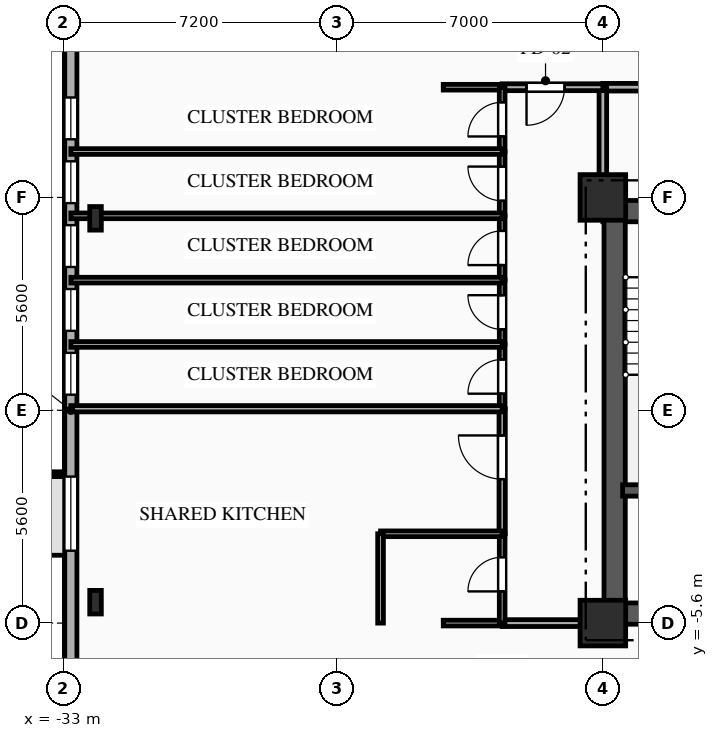
"""IFC4 building model, lengths in metres.
Left out: names, types, materials, properties, quantities, classifications, styles, units other than length and angle.
Written with IfcOpenShell. Run it as: python <this file> out.ifc"""

import sys

from ifc_helpers import new_model, si_unit, direction, frame, frame_2d, origin, origin_2d, place, context, subcontext, project, spatial, rectangle, i_section, extrude, element, fill, save


model = new_model("IFC4")
c1 = context("Model", 3, precision=1e-05, world=origin(), true_north=direction((0.0, 1.0)))
c2 = subcontext(c1, "Body", "Model", "MODEL_VIEW")
j1 = project(units=[si_unit("LENGTHUNIT", "METRE"), si_unit("PLANEANGLEUNIT", "RADIAN")], contexts=[c1])
p1 = place(None, origin())
s1 = spatial("IfcSite", under=j1, at=p1, CompositionType="ELEMENT")
p2 = place(p1, origin())
s2 = spatial("IfcBuilding", under=s1, at=p2, CompositionType="ELEMENT")
p3 = place(p2, frame((0.0, 0.0, 43.75)))
s3 = spatial("IfcBuildingStorey", under=s2, at=p3, CompositionType="ELEMENT", Elevation=43.75)
for number, where, z_axis, x_axis in (
    (1, (-18.8, -5.6, 0.0), (0.0, 0.0, 1.0), (1.0, 0.0, 0.0)),
    (2, (-18.8, 5.6, 0.0), (0.0, 0.0, 1.0), (1.0, 0.0, 0.0)),
):
    element("IfcColumn", number, at=place(p3, frame(where, z_axis=z_axis, x_axis=x_axis)), inside=s3, PredefinedType="COLUMN", context=c2, shape_type="SweptSolid", body=[
        extrude(rectangle(XDim=1.2, YDim=1.2, at=origin_2d()), origin(), (0.0, 0.0, 1.0), 3.35),
    ])
for number, where, z_axis, x_axis in (
    (3, (-32.15, 5.05, 0.0), (0.0, 0.0, 1.0), (1.0, 0.0, 0.0)),
    (4, (-32.15, -5.05, 0.0), (0.0, 0.0, 1.0), (1.0, 0.0, 0.0)),
):
    element("IfcColumn", number, at=place(p3, frame(where, z_axis=z_axis, x_axis=x_axis)), inside=s3, PredefinedType="COLUMN", context=c2, shape_type="SweptSolid", body=[
        extrude(i_section(OverallWidth=0.305, OverallDepth=0.62, WebThickness=0.021, FlangeThickness=0.04, FilletRadius=0.027, at=origin_2d()), origin(), (0.0, 0.0, 1.0), 3.35),
    ])
p4 = place(p3, frame((-32.8, -15.8, 0.0), z_axis=(0.0, 0.0, 1.0), x_axis=(0.0, 1.0, 0.0)))
e5 = element("IfcWall", 5, at=p4, inside=s3, PredefinedType="SOLIDWALL", context=c2, shape_type="SweptSolid", body=[
    extrude(rectangle(XDim=31.6, YDim=0.32, at=frame_2d((15.8, 0.0))), origin(), (0.0, 0.0, 1.0), 3.035),
])
p5 = place(p4, frame((12.105, 0.0, 0.85)))
e6 = element("IfcOpeningElement", 6, at=p5, cuts=e5, PredefinedType="OPENING", context=c2, shape_type="SweptSolid", body=[
    extrude(rectangle(XDim=1.95, YDim=1.85, at=frame_2d((0.975, 0.925))), frame((0.0, 0.17, 0.0), z_axis=(0.0, -1.0, 0.0), x_axis=(1.0, 0.0, 0.0)), (0.0, 0.0, 1.0), 0.34),
])
p6 = place(p4, frame((16.21, 0.0, 0.85)))
e7 = element("IfcOpeningElement", 7, at=p6, cuts=e5, PredefinedType="OPENING", context=c2, shape_type="SweptSolid", body=[
    extrude(rectangle(XDim=1.1, YDim=1.85, at=frame_2d((0.55, 0.925))), frame((0.0, 0.17, 0.0), z_axis=(0.0, -1.0, 0.0), x_axis=(1.0, 0.0, 0.0)), (0.0, 0.0, 1.0), 0.34),
])
p7 = place(p4, frame((17.89, 0.0, 0.85)))
e8 = element("IfcOpeningElement", 8, at=p7, cuts=e5, PredefinedType="OPENING", context=c2, shape_type="SweptSolid", body=[
    extrude(rectangle(XDim=1.1, YDim=1.85, at=frame_2d((0.55, 0.925))), frame((0.0, 0.17, 0.0), z_axis=(0.0, -1.0, 0.0), x_axis=(1.0, 0.0, 0.0)), (0.0, 0.0, 1.0), 0.34),
])
p8 = place(p4, frame((19.57, 0.0, 0.85)))
e9 = element("IfcOpeningElement", 9, at=p8, cuts=e5, PredefinedType="OPENING", context=c2, shape_type="SweptSolid", body=[
    extrude(rectangle(XDim=1.1, YDim=1.85, at=frame_2d((0.55, 0.925))), frame((0.0, 0.17, 0.0), z_axis=(0.0, -1.0, 0.0), x_axis=(1.0, 0.0, 0.0)), (0.0, 0.0, 1.0), 0.34),
])
p9 = place(p4, frame((21.25, 0.0, 0.85)))
e10 = element("IfcOpeningElement", 10, at=p9, cuts=e5, PredefinedType="OPENING", context=c2, shape_type="SweptSolid", body=[
    extrude(rectangle(XDim=1.1, YDim=1.85, at=frame_2d((0.55, 0.925))), frame((0.0, 0.17, 0.0), z_axis=(0.0, -1.0, 0.0), x_axis=(1.0, 0.0, 0.0)), (0.0, 0.0, 1.0), 0.34),
])
p10 = place(p4, frame((22.93, 0.0, 0.85)))
e11 = element("IfcOpeningElement", 11, at=p10, cuts=e5, PredefinedType="OPENING", context=c2, shape_type="SweptSolid", body=[
    extrude(rectangle(XDim=1.1, YDim=1.85, at=frame_2d((0.55, 0.925))), frame((0.0, 0.17, 0.0), z_axis=(0.0, -1.0, 0.0), x_axis=(1.0, 0.0, 0.0)), (0.0, 0.0, 1.0), 0.34),
])
p11 = place(p3, frame((-18.8, 5.24, 0.0), z_axis=(0.0, 0.0, 1.0), x_axis=(1.0, 0.0, 0.0)))
e12 = element("IfcWall", 12, at=p11, inside=s3, PredefinedType="SHEAR", context=c2, shape_type="SweptSolid", body=[
    extrude(rectangle(XDim=9.6, YDim=0.56, at=frame_2d((4.8, 0.0))), origin(), (0.0, 0.0, 1.0), 3.035),
])
p12 = place(p11, frame((1.55, 0.0, 0.0)))
e13 = element("IfcOpeningElement", 13, at=p12, cuts=e12, PredefinedType="OPENING", context=c2, shape_type="SweptSolid", body=[
    extrude(rectangle(XDim=1.1, YDim=2.15, at=frame_2d((0.55, 1.075))), frame((0.0, 0.29, 0.0), z_axis=(0.0, -1.0, 0.0), x_axis=(1.0, 0.0, 0.0)), (0.0, 0.0, 1.0), 0.58),
])
p13 = place(p11, frame((4.775, 0.0, 0.0)))
e14 = element("IfcOpeningElement", 14, at=p13, cuts=e12, PredefinedType="OPENING", context=c2, shape_type="SweptSolid", body=[
    extrude(rectangle(XDim=1.05, YDim=2.1, at=frame_2d((0.525, 1.05))), frame((0.0, 0.29, 0.0), z_axis=(0.0, -1.0, 0.0), x_axis=(1.0, 0.0, 0.0)), (0.0, 0.0, 1.0), 0.58),
])
p14 = place(p3, frame((-18.8, -5.35, 0.0), z_axis=(0.0, 0.0, 1.0), x_axis=(1.0, 0.0, 0.0)))
e15 = element("IfcWall", 15, at=p14, inside=s3, PredefinedType="SHEAR", context=c2, shape_type="SweptSolid", body=[
    extrude(rectangle(XDim=9.6, YDim=0.56, at=frame_2d((4.8, 0.0))), origin(), (0.0, 0.0, 1.0), 3.035),
])
p15 = place(p14, frame((1.05, 0.0, 0.0)))
e16 = element("IfcOpeningElement", 16, at=p15, cuts=e15, PredefinedType="OPENING", context=c2, shape_type="SweptSolid", body=[
    extrude(rectangle(XDim=0.9, YDim=2.1, at=frame_2d((0.45, 1.05))), frame((0.0, 0.29, 0.0), z_axis=(0.0, -1.0, 0.0), x_axis=(1.0, 0.0, 0.0)), (0.0, 0.0, 1.0), 0.58),
])
p16 = place(p3, frame((-18.49, -5.05, 0.0), z_axis=(0.0, 0.0, 1.0), x_axis=(0.0, 1.0, 0.0)))
e17 = element("IfcWall", 17, at=p16, inside=s3, PredefinedType="SHEAR", context=c2, shape_type="SweptSolid", body=[
    extrude(rectangle(XDim=10.1, YDim=0.56, at=frame_2d((5.05, 0.0))), origin(), (0.0, 0.0, 1.0), 3.035),
])
p17 = place(p3, frame((-18.28, -2.11, 0.0), z_axis=(0.0, 0.0, 1.0), x_axis=(1.0, 0.0, 0.0)))
e18 = element("IfcWall", 18, at=p17, inside=s3, PredefinedType="SHEAR", context=c2, shape_type="SweptSolid", body=[
    extrude(rectangle(XDim=3.18, YDim=0.3, at=frame_2d((1.59, 0.0))), origin(), (0.0, 0.0, 1.0), 3.035),
])
p18 = place(p3, frame((-12.0, 8.5, 0.0), z_axis=(0.0, 0.0, 1.0), x_axis=(-1.0, 0.0, 0.0)))
e19 = element("IfcWall", 19, at=p18, inside=s3, PredefinedType="PARTITIONING", context=c2, shape_type="SweptSolid", body=[
    extrude(rectangle(XDim=6.8, YDim=0.2, at=frame_2d((3.4, 0.0))), origin(), (0.0, 0.0, 1.0), 3.035),
])
p19 = place(p18, frame((1.715, 0.0, 0.0)))
e20 = element("IfcOpeningElement", 20, at=p19, cuts=e19, PredefinedType="OPENING", context=c2, shape_type="SweptSolid", body=[
    extrude(rectangle(XDim=1.1, YDim=2.15, at=frame_2d((0.55, 1.075))), frame((0.0, 0.11, 0.0), z_axis=(0.0, -1.0, 0.0), x_axis=(1.0, 0.0, 0.0)), (0.0, 0.0, 1.0), 0.22),
])
p20 = place(p3, frame((-18.8, 8.5, 0.0), z_axis=(0.0, 0.0, 1.0), x_axis=(0.0, -1.0, 0.0)))
e21 = element("IfcWall", 21, at=p20, inside=s3, PredefinedType="PARTITIONING", context=c2, shape_type="SweptSolid", body=[
    extrude(rectangle(XDim=2.9, YDim=0.2, at=frame_2d((1.45, 0.0))), origin(), (0.0, 0.0, 1.0), 2.52),
])
p21 = place(p3, frame((-18.8, 8.5, 0.0), z_axis=(0.0, 0.0, 1.0), x_axis=(-1.0, 0.0, 0.0)))
e22 = element("IfcWall", 22, at=p21, inside=s3, PredefinedType="PARTITIONING", context=c2, shape_type="SweptSolid", body=[
    extrude(rectangle(XDim=2.65, YDim=0.18, at=frame_2d((1.325, 0.0))), origin(), (0.0, 0.0, 1.0), 3.035),
])
p22 = place(p21, frame((1.009, 0.0, 0.0)))
e23 = element("IfcOpeningElement", 23, at=p22, cuts=e22, PredefinedType="OPENING", context=c2, shape_type="SweptSolid", body=[
    extrude(rectangle(XDim=1.0, YDim=2.15, at=frame_2d((0.5, 1.075))), frame((0.0, 0.1, 0.0), z_axis=(0.0, -1.0, 0.0), x_axis=(1.0, 0.0, 0.0)), (0.0, 0.0, 1.0), 0.2),
])
p23 = place(p3, frame((-21.45, 8.5, 0.0), z_axis=(0.0, 0.0, 1.0), x_axis=(-1.0, 0.0, 0.0)))
e24 = element("IfcWall", 24, at=p23, inside=s3, PredefinedType="PARTITIONING", context=c2, shape_type="SweptSolid", body=[
    extrude(rectangle(XDim=1.55, YDim=0.15, at=frame_2d((0.775, 0.0))), origin(), (0.0, 0.0, 1.0), 3.035),
])
p24 = place(p3, frame((-21.45, -5.6, 0.0), z_axis=(0.0, 0.0, 1.0), x_axis=(1.0, 0.0, 0.0)))
e25 = element("IfcWall", 25, at=p24, inside=s3, PredefinedType="PARTITIONING", context=c2, shape_type="SweptSolid", body=[
    extrude(rectangle(XDim=2.65, YDim=0.18, at=frame_2d((1.325, 0.0))), origin(), (0.0, 0.0, 1.0), 3.035),
])
p25 = place(p3, frame((-23.0, -5.6, 0.0), z_axis=(0.0, 0.0, 1.0), x_axis=(1.0, 0.0, 0.0)))
e26 = element("IfcWall", 26, at=p25, inside=s3, PredefinedType="PLUMBINGWALL", context=c2, shape_type="SweptSolid", body=[
    extrude(rectangle(XDim=1.55, YDim=0.15, at=frame_2d((0.775, 0.0))), origin(), (0.0, 0.0, 1.0), 3.035),
])
p26 = place(p3, frame((-21.45, -5.6, 0.0), z_axis=(0.0, 0.0, 1.0), x_axis=(0.0, 1.0, 0.0)))
e27 = element("IfcWall", 27, at=p26, inside=s3, PredefinedType="PLUMBINGWALL", context=c2, shape_type="SweptSolid", body=[
    extrude(rectangle(XDim=2.35, YDim=0.15, at=frame_2d((1.175, 0.0))), origin(), (0.0, 0.0, 1.0), 3.035),
])
p27 = place(p26, frame((0.834, 0.0, 0.0)))
e28 = element("IfcOpeningElement", 28, at=p27, cuts=e27, PredefinedType="OPENING", context=c2, shape_type="SweptSolid", body=[
    extrude(rectangle(XDim=0.9, YDim=2.1, at=frame_2d((0.45, 1.05))), frame((0.0, 0.085, 0.0), z_axis=(0.0, -1.0, 0.0), x_axis=(1.0, 0.0, 0.0)), (0.0, 0.0, 1.0), 0.17),
])
p28 = place(p3, frame((-21.45, -3.25, 0.0), z_axis=(0.0, 0.0, 1.0), x_axis=(0.0, 1.0, 0.0)))
e29 = element("IfcWall", 29, at=p28, inside=s3, PredefinedType="PARTITIONING", context=c2, shape_type="SweptSolid", body=[
    extrude(rectangle(XDim=3.29, YDim=0.165, at=frame_2d((1.645, 0.0))), origin(), (0.0, 0.0, 1.0), 3.035),
])
p29 = place(p28, frame((1.438, 0.0, 0.0)))
e30 = element("IfcOpeningElement", 30, at=p29, cuts=e29, PredefinedType="OPENING", context=c2, shape_type="SweptSolid", body=[
    extrude(rectangle(XDim=1.15, YDim=2.15, at=frame_2d((0.575, 1.075))), frame((0.0, 0.093, 0.0), z_axis=(0.0, -1.0, 0.0), x_axis=(1.0, 0.0, 0.0)), (0.0, 0.0, 1.0), 0.185),
])
p30 = place(p3, frame((-21.45, 0.04, 0.0), z_axis=(0.0, 0.0, 1.0), x_axis=(0.0, 1.0, 0.0)))
e31 = element("IfcWall", 31, at=p30, inside=s3, PredefinedType="PARTITIONING", context=c2, shape_type="SweptSolid", body=[
    extrude(rectangle(XDim=1.692, YDim=0.15, at=frame_2d((0.846, 0.0))), origin(), (0.0, 0.0, 1.0), 3.035),
])
p31 = place(p30, frame((0.396, 0.0, 0.0)))
e32 = element("IfcOpeningElement", 32, at=p31, cuts=e31, PredefinedType="OPENING", context=c2, shape_type="SweptSolid", body=[
    extrude(rectangle(XDim=0.9, YDim=2.1, at=frame_2d((0.45, 1.05))), frame((0.0, 0.085, 0.0), z_axis=(0.0, -1.0, 0.0), x_axis=(1.0, 0.0, 0.0)), (0.0, 0.0, 1.0), 0.17),
])
p32 = place(p3, frame((-21.45, 1.732, 0.0), z_axis=(0.0, 0.0, 1.0), x_axis=(0.0, 1.0, 0.0)))
e33 = element("IfcWall", 33, at=p32, inside=s3, PredefinedType="PARTITIONING", context=c2, shape_type="SweptSolid", body=[
    extrude(rectangle(XDim=1.692, YDim=0.15, at=frame_2d((0.846, 0.0))), origin(), (0.0, 0.0, 1.0), 3.035),
])
p33 = place(p32, frame((0.396, 0.0, 0.0)))
e34 = element("IfcOpeningElement", 34, at=p33, cuts=e33, PredefinedType="OPENING", context=c2, shape_type="SweptSolid", body=[
    extrude(rectangle(XDim=0.9, YDim=2.1, at=frame_2d((0.45, 1.05))), frame((0.0, 0.085, 0.0), z_axis=(0.0, -1.0, 0.0), x_axis=(1.0, 0.0, 0.0)), (0.0, 0.0, 1.0), 0.17),
])
p34 = place(p3, frame((-21.45, 3.424, 0.0), z_axis=(0.0, 0.0, 1.0), x_axis=(0.0, 1.0, 0.0)))
e35 = element("IfcWall", 35, at=p34, inside=s3, PredefinedType="PARTITIONING", context=c2, shape_type="SweptSolid", body=[
    extrude(rectangle(XDim=1.692, YDim=0.15, at=frame_2d((0.846, 0.0))), origin(), (0.0, 0.0, 1.0), 3.035),
])
p35 = place(p34, frame((0.396, 0.0, 0.0)))
e36 = element("IfcOpeningElement", 36, at=p35, cuts=e35, PredefinedType="OPENING", context=c2, shape_type="SweptSolid", body=[
    extrude(rectangle(XDim=0.9, YDim=2.1, at=frame_2d((0.45, 1.05))), frame((0.0, 0.085, 0.0), z_axis=(0.0, -1.0, 0.0), x_axis=(1.0, 0.0, 0.0)), (0.0, 0.0, 1.0), 0.17),
])
p36 = place(p3, frame((-21.45, 5.116, 0.0), z_axis=(0.0, 0.0, 1.0), x_axis=(0.0, 1.0, 0.0)))
e37 = element("IfcWall", 37, at=p36, inside=s3, PredefinedType="PARTITIONING", context=c2, shape_type="SweptSolid", body=[
    extrude(rectangle(XDim=1.692, YDim=0.15, at=frame_2d((0.846, 0.0))), origin(), (0.0, 0.0, 1.0), 3.035),
])
p37 = place(p36, frame((0.396, 0.0, 0.0)))
e38 = element("IfcOpeningElement", 38, at=p37, cuts=e37, PredefinedType="OPENING", context=c2, shape_type="SweptSolid", body=[
    extrude(rectangle(XDim=0.9, YDim=2.1, at=frame_2d((0.45, 1.05))), frame((0.0, 0.085, 0.0), z_axis=(0.0, -1.0, 0.0), x_axis=(1.0, 0.0, 0.0)), (0.0, 0.0, 1.0), 0.17),
])
p38 = place(p3, frame((-21.45, 6.808, 0.0), z_axis=(0.0, 0.0, 1.0), x_axis=(0.0, 1.0, 0.0)))
e39 = element("IfcWall", 39, at=p38, inside=s3, PredefinedType="PARTITIONING", context=c2, shape_type="SweptSolid", body=[
    extrude(rectangle(XDim=1.692, YDim=0.15, at=frame_2d((0.846, 0.0))), origin(), (0.0, 0.0, 1.0), 3.035),
])
p39 = place(p38, frame((0.396, 0.0, 0.0)))
e40 = element("IfcOpeningElement", 40, at=p39, cuts=e39, PredefinedType="OPENING", context=c2, shape_type="SweptSolid", body=[
    extrude(rectangle(XDim=0.9, YDim=2.1, at=frame_2d((0.45, 1.05))), frame((0.0, 0.085, 0.0), z_axis=(0.0, -1.0, 0.0), x_axis=(1.0, 0.0, 0.0)), (0.0, 0.0, 1.0), 0.17),
])
p40 = place(p3, frame((-24.65, -3.25, 0.0), z_axis=(0.0, 0.0, 1.0), x_axis=(1.0, 0.0, 0.0)))
e41 = element("IfcWall", 41, at=p40, inside=s3, PredefinedType="PLUMBINGWALL", context=c2, shape_type="SweptSolid", body=[
    extrude(rectangle(XDim=3.2, YDim=0.15, at=frame_2d((1.6, 0.0))), origin(), (0.0, 0.0, 1.0), 2.52),
])
p41 = place(p3, frame((-24.65, -5.6, 0.0), z_axis=(0.0, 0.0, 1.0), x_axis=(0.0, 1.0, 0.0)))
e42 = element("IfcWall", 42, at=p41, inside=s3, PredefinedType="PLUMBINGWALL", context=c2, shape_type="SweptSolid", body=[
    extrude(rectangle(XDim=2.35, YDim=0.15, at=frame_2d((1.175, 0.0))), origin(), (0.0, 0.0, 1.0), 3.035),
])
p42 = place(p3, frame((-32.8, 0.04, 0.0), z_axis=(0.0, 0.0, 1.0), x_axis=(1.0, 0.0, 0.0)))
e43 = element("IfcWall", 43, at=p42, inside=s3, PredefinedType="PARTITIONING", context=c2, shape_type="SweptSolid", body=[
    extrude(rectangle(XDim=11.35, YDim=0.165, at=frame_2d((5.675, 0.0))), origin(), (0.0, 0.0, 1.0), 3.035),
])
p43 = place(p3, frame((-32.8, 1.732, 0.0), z_axis=(0.0, 0.0, 1.0), x_axis=(1.0, 0.0, 0.0)))
e44 = element("IfcWall", 44, at=p43, inside=s3, PredefinedType="PARTITIONING", context=c2, shape_type="SweptSolid", body=[
    extrude(rectangle(XDim=11.35, YDim=0.15, at=frame_2d((5.675, 0.0))), origin(), (0.0, 0.0, 1.0), 3.035),
])
for number, where, z_axis, x_axis in (
    (45, (-32.8, 3.424, 0.0), (0.0, 0.0, 1.0), (1.0, 0.0, 0.0)),
    (46, (-32.8, 5.116, 0.0), (0.0, 0.0, 1.0), (1.0, 0.0, 0.0)),
):
    element("IfcWall", number, at=place(p3, frame(where, z_axis=z_axis, x_axis=x_axis)), inside=s3, PredefinedType="PARTITIONING", context=c2, shape_type="SweptSolid", body=[
        extrude(rectangle(XDim=11.35, YDim=0.15, at=frame_2d((5.675, 0.0))), origin(), (0.0, 0.0, 1.0), 2.52),
    ])
p44 = place(p3, frame((-32.8, 6.808, 0.0), z_axis=(0.0, 0.0, 1.0), x_axis=(1.0, 0.0, 0.0)))
e47 = element("IfcWall", 47, at=p44, inside=s3, PredefinedType="PARTITIONING", context=c2, shape_type="SweptSolid", body=[
    extrude(rectangle(XDim=11.35, YDim=0.15, at=frame_2d((5.675, 0.0))), origin(), (0.0, 0.0, 1.0), 3.035),
])
p45 = place(p5, origin())
e48 = element("IfcWindow", 48, at=p45, inside=s3, PartitioningType="SINGLE_PANEL", PredefinedType="WINDOW", context=c2, shape_type="SweptSolid", body=[
    extrude(rectangle(XDim=1.95, YDim=1.85, at=frame_2d((0.975, 0.925))), frame((0.0, 0.03, 0.0), z_axis=(0.0, -1.0, 0.0), x_axis=(1.0, 0.0, 0.0)), (0.0, 0.0, 1.0), 0.06),
])
fill(e6, e48)
p46 = place(p6, origin())
e49 = element("IfcWindow", 49, at=p46, inside=s3, PartitioningType="SINGLE_PANEL", PredefinedType="WINDOW", context=c2, shape_type="SweptSolid", body=[
    extrude(rectangle(XDim=1.1, YDim=1.85, at=frame_2d((0.55, 0.925))), frame((0.0, 0.03, 0.0), z_axis=(0.0, -1.0, 0.0), x_axis=(1.0, 0.0, 0.0)), (0.0, 0.0, 1.0), 0.06),
])
fill(e7, e49)
p47 = place(p7, origin())
e50 = element("IfcWindow", 50, at=p47, inside=s3, PartitioningType="SINGLE_PANEL", PredefinedType="WINDOW", context=c2, shape_type="SweptSolid", body=[
    extrude(rectangle(XDim=1.1, YDim=1.85, at=frame_2d((0.55, 0.925))), frame((0.0, 0.03, 0.0), z_axis=(0.0, -1.0, 0.0), x_axis=(1.0, 0.0, 0.0)), (0.0, 0.0, 1.0), 0.06),
])
fill(e8, e50)
p48 = place(p8, origin())
e51 = element("IfcWindow", 51, at=p48, inside=s3, PartitioningType="SINGLE_PANEL", PredefinedType="WINDOW", context=c2, shape_type="SweptSolid", body=[
    extrude(rectangle(XDim=1.1, YDim=1.85, at=frame_2d((0.55, 0.925))), frame((0.0, 0.03, 0.0), z_axis=(0.0, -1.0, 0.0), x_axis=(1.0, 0.0, 0.0)), (0.0, 0.0, 1.0), 0.06),
])
fill(e9, e51)
p49 = place(p9, origin())
e52 = element("IfcWindow", 52, at=p49, inside=s3, PartitioningType="SINGLE_PANEL", PredefinedType="WINDOW", context=c2, shape_type="SweptSolid", body=[
    extrude(rectangle(XDim=1.1, YDim=1.85, at=frame_2d((0.55, 0.925))), frame((0.0, 0.03, 0.0), z_axis=(0.0, -1.0, 0.0), x_axis=(1.0, 0.0, 0.0)), (0.0, 0.0, 1.0), 0.06),
])
fill(e10, e52)
p50 = place(p10, origin())
e53 = element("IfcWindow", 53, at=p50, inside=s3, PartitioningType="SINGLE_PANEL", PredefinedType="WINDOW", context=c2, shape_type="SweptSolid", body=[
    extrude(rectangle(XDim=1.1, YDim=1.85, at=frame_2d((0.55, 0.925))), frame((0.0, 0.03, 0.0), z_axis=(0.0, -1.0, 0.0), x_axis=(1.0, 0.0, 0.0)), (0.0, 0.0, 1.0), 0.06),
])
fill(e11, e53)
p51 = place(p22, origin())
e54 = element("IfcDoor", 54, at=p51, inside=s3, OperationType="SINGLE_SWING_RIGHT", PredefinedType="DOOR", context=c2, shape_type="SweptSolid", body=[
    extrude(rectangle(XDim=1.0, YDim=2.15, at=frame_2d((0.5, 1.075))), frame((0.0, 0.025, 0.0), z_axis=(0.0, -1.0, 0.0), x_axis=(1.0, 0.0, 0.0)), (0.0, 0.0, 1.0), 0.05),
])
fill(e23, e54)
p52 = place(p27, origin())
e55 = element("IfcDoor", 55, at=p52, inside=s3, OperationType="SINGLE_SWING_LEFT", PredefinedType="DOOR", context=c2, shape_type="SweptSolid", body=[
    extrude(rectangle(XDim=0.9, YDim=2.1, at=frame_2d((0.45, 1.05))), frame((0.0, 0.025, 0.0), z_axis=(0.0, -1.0, 0.0), x_axis=(1.0, 0.0, 0.0)), (0.0, 0.0, 1.0), 0.05),
])
fill(e28, e55)
p53 = place(p29, origin())
e56 = element("IfcDoor", 56, at=p53, inside=s3, OperationType="SINGLE_SWING_RIGHT", PredefinedType="DOOR", context=c2, shape_type="SweptSolid", body=[
    extrude(rectangle(XDim=1.15, YDim=2.15, at=frame_2d((0.575, 1.075))), frame((0.0, 0.025, 0.0), z_axis=(0.0, -1.0, 0.0), x_axis=(1.0, 0.0, 0.0)), (0.0, 0.0, 1.0), 0.05),
])
fill(e30, e56)
p54 = place(p31, origin())
e57 = element("IfcDoor", 57, at=p54, inside=s3, OperationType="SINGLE_SWING_LEFT", PredefinedType="DOOR", context=c2, shape_type="SweptSolid", body=[
    extrude(rectangle(XDim=0.9, YDim=2.1, at=frame_2d((0.45, 1.05))), frame((0.0, 0.025, 0.0), z_axis=(0.0, -1.0, 0.0), x_axis=(1.0, 0.0, 0.0)), (0.0, 0.0, 1.0), 0.05),
])
fill(e32, e57)
p55 = place(p33, origin())
e58 = element("IfcDoor", 58, at=p55, inside=s3, OperationType="SINGLE_SWING_RIGHT", PredefinedType="DOOR", context=c2, shape_type="SweptSolid", body=[
    extrude(rectangle(XDim=0.9, YDim=2.1, at=frame_2d((0.45, 1.05))), frame((0.0, 0.025, 0.0), z_axis=(0.0, -1.0, 0.0), x_axis=(1.0, 0.0, 0.0)), (0.0, 0.0, 1.0), 0.05),
])
fill(e34, e58)
p56 = place(p35, origin())
e59 = element("IfcDoor", 59, at=p56, inside=s3, OperationType="SINGLE_SWING_LEFT", PredefinedType="DOOR", context=c2, shape_type="SweptSolid", body=[
    extrude(rectangle(XDim=0.9, YDim=2.1, at=frame_2d((0.45, 1.05))), frame((0.0, 0.025, 0.0), z_axis=(0.0, -1.0, 0.0), x_axis=(1.0, 0.0, 0.0)), (0.0, 0.0, 1.0), 0.05),
])
fill(e36, e59)
p57 = place(p37, origin())
e60 = element("IfcDoor", 60, at=p57, inside=s3, OperationType="SINGLE_SWING_RIGHT", PredefinedType="DOOR", context=c2, shape_type="SweptSolid", body=[
    extrude(rectangle(XDim=0.9, YDim=2.1, at=frame_2d((0.45, 1.05))), frame((0.0, 0.025, 0.0), z_axis=(0.0, -1.0, 0.0), x_axis=(1.0, 0.0, 0.0)), (0.0, 0.0, 1.0), 0.05),
])
fill(e38, e60)
p58 = place(p39, origin())
e61 = element("IfcDoor", 61, at=p58, inside=s3, OperationType="SINGLE_SWING_LEFT", PredefinedType="DOOR", context=c2, shape_type="SweptSolid", body=[
    extrude(rectangle(XDim=0.9, YDim=2.1, at=frame_2d((0.45, 1.05))), frame((0.0, 0.025, 0.0), z_axis=(0.0, -1.0, 0.0), x_axis=(1.0, 0.0, 0.0)), (0.0, 0.0, 1.0), 0.05),
])
fill(e40, e61)
save(model, sys.argv[1])
